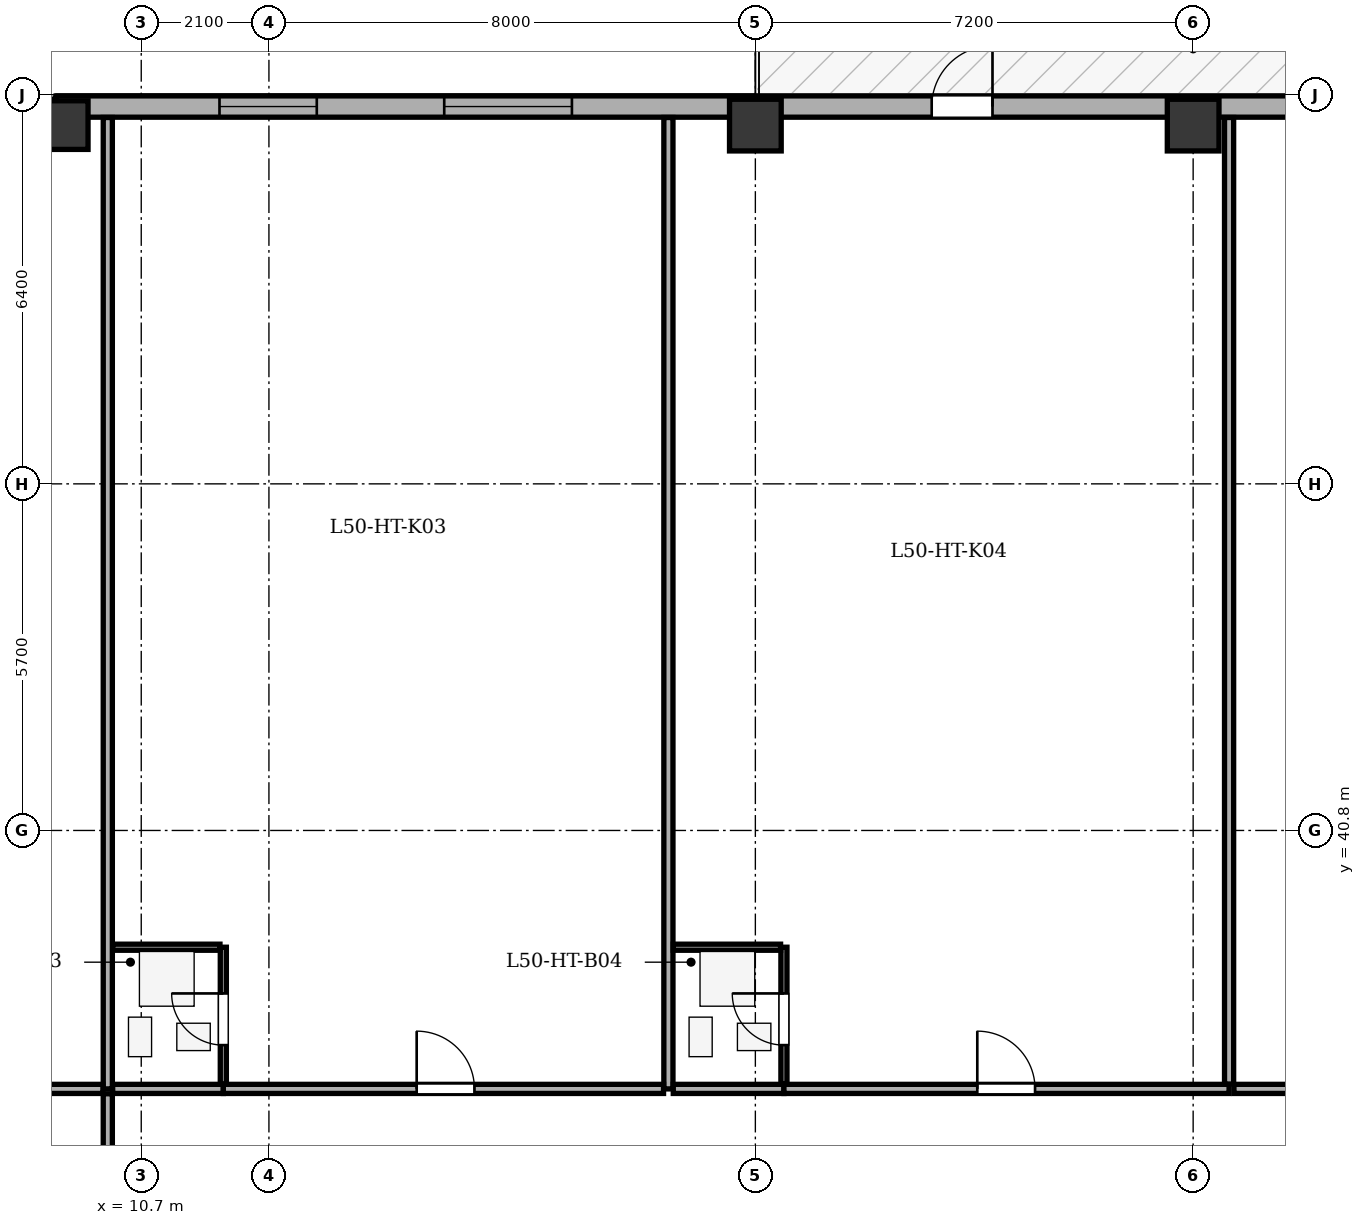
"""IFC4 building model, lengths in metres.
Left out: names, types, materials, properties, quantities, classifications, styles, units other than length and angle.
Written with IfcOpenShell. Run it as: python <this file> out.ifc"""

import sys

from ifc_helpers import new_model, si_unit, direction, frame, frame_2d, origin, origin_2d, place, context, subcontext, project, spatial, rectangle, extrude, element, fill, save


model = new_model("IFC4")
c1 = context("Model", 3, precision=1e-05, world=origin(), true_north=direction((0.0, 1.0)))
c2 = subcontext(c1, "Body", "Model", "MODEL_VIEW")
j1 = project(units=[si_unit("LENGTHUNIT", "METRE"), si_unit("PLANEANGLEUNIT", "RADIAN")], contexts=[c1])
p1 = place(None, origin())
s1 = spatial("IfcSite", under=j1, at=p1, CompositionType="ELEMENT")
p2 = place(p1, origin())
s2 = spatial("IfcBuilding", under=s1, at=p2, CompositionType="ELEMENT")
p3 = place(p2, frame((0.0, 0.0, 193.8)))
s3 = spatial("IfcBuildingStorey", under=s2, at=p3, CompositionType="ELEMENT", Elevation=193.8)
p4 = place(p3, frame((9.3, 52.4, 0.0), z_axis=(0.0, 0.0, 1.0), x_axis=(1.0, 0.0, 0.0)))
e1 = element("IfcColumn", 1, at=p4, inside=s3, PredefinedType="COLUMN", context=c2, shape_type="SweptSolid", body=[
    extrude(rectangle(XDim=0.8, YDim=1.05, at=origin_2d()), origin(), (0.0, 0.0, 1.0), 3.5),
])
for number, where, z_axis, x_axis in (
    (2, (20.8, 52.4, 0.0), (0.0, 0.0, 1.0), (1.0, 0.0, 0.0)),
    (3, (28.0, 52.4, 0.0), (0.0, 0.0, 1.0), (1.0, 0.0, 0.0)),
):
    element("IfcColumn", number, at=place(p3, frame(where, z_axis=z_axis, x_axis=x_axis)), inside=s3, PredefinedType="COLUMN", context=c2, shape_type="SweptSolid", body=[
        extrude(rectangle(XDim=0.85, YDim=0.85, at=origin_2d()), origin(), (0.0, 0.0, 1.0), 3.5),
    ])
p5 = place(p3, frame((4.495, 47.9, 0.0), z_axis=(0.0, 0.0, 1.0), x_axis=(0.707088817216, 0.7071247447, 0.0)))
e4 = element("IfcWall", 4, at=p5, inside=s3, PredefinedType="STANDARD", context=c2, shape_type="SweptSolid", body=[
    extrude(rectangle(XDim=6.795, YDim=0.35, at=frame_2d((3.398, 0.0))), origin(), (0.0, 0.0, 1.0), 2.635),
])
p6 = place(p5, frame((2.698, 0.0, 0.75)))
e5 = element("IfcOpeningElement", 5, at=p6, cuts=e4, PredefinedType="OPENING", context=c2, shape_type="SweptSolid", body=[
    extrude(rectangle(XDim=1.4, YDim=1.65, at=frame_2d((0.7, 0.825))), frame((0.0, 0.185, 0.0), z_axis=(0.0, -1.0, 0.0), x_axis=(1.0, 0.0, 0.0)), (0.0, 0.0, 1.0), 0.37),
])
p7 = place(p3, frame((9.3, 52.705, 0.0), z_axis=(0.0, 0.0, 1.0), x_axis=(1.0, 0.0, 0.0)))
e6 = element("IfcWall", 6, at=p7, inside=s3, PredefinedType="STANDARD", context=c2, shape_type="SweptSolid", body=[
    extrude(rectangle(XDim=35.0, YDim=0.35, at=frame_2d((17.5, 0.0))), origin(), (0.0, 0.0, 1.0), 2.635),
])
p8 = place(p7, frame((14.4, 0.0, 0.0)))
e7 = element("IfcOpeningElement", 7, at=p8, cuts=e6, PredefinedType="OPENING", context=c2, shape_type="SweptSolid", body=[
    extrude(rectangle(XDim=1.0, YDim=2.02, at=frame_2d((0.5, 1.01))), frame((0.0, 0.185, 0.0), z_axis=(0.0, -1.0, 0.0), x_axis=(1.0, 0.0, 0.0)), (0.0, 0.0, 1.0), 0.37),
])
p9 = place(p7, frame((2.687, 0.0, 0.75)))
e8 = element("IfcOpeningElement", 8, at=p9, cuts=e6, PredefinedType="OPENING", context=c2, shape_type="SweptSolid", body=[
    extrude(rectangle(XDim=1.6, YDim=1.75, at=frame_2d((0.8, 0.875))), frame((0.0, 0.185, 0.0), z_axis=(0.0, -1.0, 0.0), x_axis=(1.0, 0.0, 0.0)), (0.0, 0.0, 1.0), 0.37),
])
p10 = place(p7, frame((6.383, 0.0, 0.75)))
e9 = element("IfcOpeningElement", 9, at=p10, cuts=e6, PredefinedType="OPENING", context=c2, shape_type="SweptSolid", body=[
    extrude(rectangle(XDim=2.1, YDim=1.75, at=frame_2d((1.05, 0.875))), frame((0.0, 0.185, 0.0), z_axis=(0.0, -1.0, 0.0), x_axis=(1.0, 0.0, 0.0)), (0.0, 0.0, 1.0), 0.37),
])
p11 = place(p7, frame((20.404, 0.0, 0.75)))
e10 = element("IfcOpeningElement", 10, at=p11, cuts=e6, PredefinedType="OPENING", context=c2, shape_type="SweptSolid", body=[
    extrude(rectangle(XDim=1.6, YDim=1.75, at=frame_2d((0.8, 0.875))), frame((0.0, 0.185, 0.0), z_axis=(0.0, -1.0, 0.0), x_axis=(1.0, 0.0, 0.0)), (0.0, 0.0, 1.0), 0.37),
])
p12 = place(p7, frame((23.012, 0.0, 0.75)))
e11 = element("IfcOpeningElement", 11, at=p12, cuts=e6, PredefinedType="OPENING", context=c2, shape_type="SweptSolid", body=[
    extrude(rectangle(XDim=1.6, YDim=1.75, at=frame_2d((0.8, 0.875))), frame((0.0, 0.185, 0.0), z_axis=(0.0, -1.0, 0.0), x_axis=(1.0, 0.0, 0.0)), (0.0, 0.0, 1.0), 0.37),
])
p13 = place(p7, frame((27.764, 0.0, 0.75)))
e12 = element("IfcOpeningElement", 12, at=p13, cuts=e6, PredefinedType="OPENING", context=c2, shape_type="SweptSolid", body=[
    extrude(rectangle(XDim=1.6, YDim=1.75, at=frame_2d((0.8, 0.875))), frame((0.0, 0.185, 0.0), z_axis=(0.0, -1.0, 0.0), x_axis=(1.0, 0.0, 0.0)), (0.0, 0.0, 1.0), 0.37),
])
p14 = place(p7, frame((31.186, 0.0, 0.75)))
e13 = element("IfcOpeningElement", 13, at=p14, cuts=e6, PredefinedType="OPENING", context=c2, shape_type="SweptSolid", body=[
    extrude(rectangle(XDim=2.1, YDim=1.75, at=frame_2d((1.05, 0.875))), frame((0.0, 0.185, 0.0), z_axis=(0.0, -1.0, 0.0), x_axis=(1.0, 0.0, 0.0)), (0.0, 0.0, 1.0), 0.37),
])
for number, where, z_axis, x_axis in (
    (14, (10.15, 36.55, 0.0), (0.0, 0.0, 1.0), (0.0, 1.0, 0.0)),
    (15, (19.37, 36.55, 0.0), (0.0, 0.0, 1.0), (0.0, 1.0, 0.0)),
):
    element("IfcWall", number, at=place(p3, frame(where, z_axis=z_axis, x_axis=x_axis)), inside=s3, PredefinedType="PARTITIONING", context=c2, shape_type="SweptSolid", body=[
        extrude(rectangle(XDim=15.975, YDim=0.15, at=frame_2d((7.987, 0.0))), origin(), (0.0, 0.0, 1.0), 3.05),
    ])
p15 = place(p3, frame((10.23, 36.55, 0.0), z_axis=(0.0, 0.0, 1.0), x_axis=(1.0, 0.0, 0.0)))
e16 = element("IfcWall", 16, at=p15, inside=s3, PredefinedType="PARTITIONING", context=c2, shape_type="SweptSolid", body=[
    extrude(rectangle(XDim=1.82, YDim=0.15, at=frame_2d((0.91, 0.0))), origin(), (0.0, 0.0, 1.0), 3.05),
])
p16 = place(p3, frame((12.05, 36.55, 0.0), z_axis=(0.0, 0.0, 1.0), x_axis=(1.0, 0.0, 0.0)))
e17 = element("IfcWall", 17, at=p16, inside=s3, PredefinedType="PARTITIONING", context=c2, shape_type="SweptSolid", body=[
    extrude(rectangle(XDim=7.24, YDim=0.15, at=frame_2d((3.62, 0.0))), origin(), (0.0, 0.0, 1.0), 3.05),
])
p17 = place(p16, frame((3.18, 0.0, 0.0)))
e18 = element("IfcOpeningElement", 18, at=p17, cuts=e17, PredefinedType="OPENING", context=c2, shape_type="SweptSolid", body=[
    extrude(rectangle(XDim=0.95, YDim=2.1, at=frame_2d((0.475, 1.05))), frame((0.0, 0.085, 0.0), z_axis=(0.0, -1.0, 0.0), x_axis=(1.0, 0.0, 0.0)), (0.0, 0.0, 1.0), 0.17),
])
p18 = place(p3, frame((12.05, 36.63, 0.0), z_axis=(0.0, 0.0, 1.0), x_axis=(0.0, 1.0, 0.0)))
e19 = element("IfcWall", 19, at=p18, inside=s3, PredefinedType="PARTITIONING", context=c2, shape_type="SweptSolid", body=[
    extrude(rectangle(XDim=2.25, YDim=0.1, at=frame_2d((1.125, 0.0))), origin(), (0.0, 0.0, 1.0), 3.05),
])
p19 = place(p18, frame((0.64, 0.0, 0.0)))
e20 = element("IfcOpeningElement", 20, at=p19, cuts=e19, PredefinedType="OPENING", context=c2, shape_type="SweptSolid", body=[
    extrude(rectangle(XDim=0.85, YDim=2.05, at=frame_2d((0.425, 1.025))), frame((0.0, 0.06, 0.0), z_axis=(0.0, -1.0, 0.0), x_axis=(1.0, 0.0, 0.0)), (0.0, 0.0, 1.0), 0.12),
])
p20 = place(p3, frame((10.23, 38.88, 0.0), z_axis=(0.0, 0.0, 1.0), x_axis=(1.0, 0.0, 0.0)))
e21 = element("IfcWall", 21, at=p20, inside=s3, PredefinedType="PARTITIONING", context=c2, shape_type="SweptSolid", body=[
    extrude(rectangle(XDim=1.765, YDim=0.1, at=frame_2d((0.883, 0.0))), origin(), (0.0, 0.0, 1.0), 3.05),
])
p21 = place(p3, frame((19.45, 36.55, 0.0), z_axis=(0.0, 0.0, 1.0), x_axis=(1.0, 0.0, 0.0)))
e22 = element("IfcWall", 22, at=p21, inside=s3, PredefinedType="PARTITIONING", context=c2, shape_type="SweptSolid", body=[
    extrude(rectangle(XDim=1.82, YDim=0.15, at=frame_2d((0.91, 0.0))), origin(), (0.0, 0.0, 1.0), 3.05),
])
p22 = place(p3, frame((21.27, 36.55, 0.0), z_axis=(0.0, 0.0, 1.0), x_axis=(1.0, 0.0, 0.0)))
e23 = element("IfcWall", 23, at=p22, inside=s3, PredefinedType="PARTITIONING", context=c2, shape_type="SweptSolid", body=[
    extrude(rectangle(XDim=7.321, YDim=0.15, at=frame_2d((3.661, 0.0))), origin(), (0.0, 0.0, 1.0), 3.05),
])
p23 = place(p22, frame((3.18, 0.0, 0.0)))
e24 = element("IfcOpeningElement", 24, at=p23, cuts=e23, PredefinedType="OPENING", context=c2, shape_type="SweptSolid", body=[
    extrude(rectangle(XDim=0.95, YDim=2.1, at=frame_2d((0.475, 1.05))), frame((0.0, 0.085, 0.0), z_axis=(0.0, -1.0, 0.0), x_axis=(1.0, 0.0, 0.0)), (0.0, 0.0, 1.0), 0.17),
])
p24 = place(p3, frame((21.27, 36.63, 0.0), z_axis=(0.0, 0.0, 1.0), x_axis=(0.0, 1.0, 0.0)))
e25 = element("IfcWall", 25, at=p24, inside=s3, PredefinedType="PARTITIONING", context=c2, shape_type="SweptSolid", body=[
    extrude(rectangle(XDim=2.25, YDim=0.1, at=frame_2d((1.125, 0.0))), origin(), (0.0, 0.0, 1.0), 3.05),
])
p25 = place(p24, frame((0.64, 0.0, 0.0)))
e26 = element("IfcOpeningElement", 26, at=p25, cuts=e25, PredefinedType="OPENING", context=c2, shape_type="SweptSolid", body=[
    extrude(rectangle(XDim=0.85, YDim=2.05, at=frame_2d((0.425, 1.025))), frame((0.0, 0.06, 0.0), z_axis=(0.0, -1.0, 0.0), x_axis=(1.0, 0.0, 0.0)), (0.0, 0.0, 1.0), 0.12),
])
p26 = place(p3, frame((19.45, 38.88, 0.0), z_axis=(0.0, 0.0, 1.0), x_axis=(1.0, 0.0, 0.0)))
e27 = element("IfcWall", 27, at=p26, inside=s3, PredefinedType="PARTITIONING", context=c2, shape_type="SweptSolid", body=[
    extrude(rectangle(XDim=1.765, YDim=0.1, at=frame_2d((0.883, 0.0))), origin(), (0.0, 0.0, 1.0), 3.05),
])
p27 = place(p3, frame((28.591, 36.63, 0.0), z_axis=(0.0, 0.0, 1.0), x_axis=(0.0, 1.0, 0.0)))
e28 = element("IfcWall", 28, at=p27, inside=s3, PredefinedType="PARTITIONING", context=c2, shape_type="SweptSolid", body=[
    extrude(rectangle(XDim=15.895, YDim=0.15, at=frame_2d((7.948, 0.0))), origin(), (0.0, 0.0, 1.0), 3.05),
])
p28 = place(p3, frame((28.671, 36.55, 0.0), z_axis=(0.0, 0.0, 1.0), x_axis=(1.0, 0.0, 0.0)))
e29 = element("IfcWall", 29, at=p28, inside=s3, PredefinedType="PARTITIONING", context=c2, shape_type="SweptSolid", body=[
    extrude(rectangle(XDim=15.629, YDim=0.15, at=frame_2d((7.814, 0.0))), origin(), (0.0, 0.0, 1.0), 3.05),
])
p29 = place(p28, frame((7.255, 0.0, 0.0)))
e30 = element("IfcOpeningElement", 30, at=p29, cuts=e29, PredefinedType="OPENING", context=c2, shape_type="SweptSolid", body=[
    extrude(rectangle(XDim=1.0, YDim=2.1, at=frame_2d((0.5, 1.05))), frame((0.0, 0.085, 0.0), z_axis=(0.0, -1.0, 0.0), x_axis=(1.0, 0.0, 0.0)), (0.0, 0.0, 1.0), 0.17),
])
p30 = place(p3, frame((4.675, 36.55, 0.0), z_axis=(0.0, 0.0, 1.0), x_axis=(1.0, 0.0, 0.0)))
e31 = element("IfcWall", 31, at=p30, inside=s3, PredefinedType="PARTITIONING", context=c2, shape_type="SweptSolid", body=[
    extrude(rectangle(XDim=5.395, YDim=0.15, at=frame_2d((2.698, 0.0))), origin(), (0.0, 0.0, 1.0), 3.05),
])
p31 = place(p3, frame((10.15, 17.93, 0.0), z_axis=(0.0, 0.0, 1.0), x_axis=(0.0, 1.0, 0.0)))
e32 = element("IfcWall", 32, at=p31, inside=s3, PredefinedType="PARTITIONING", context=c2, shape_type="SweptSolid", body=[
    extrude(rectangle(XDim=18.54, YDim=0.15, at=frame_2d((9.27, 0.0))), origin(), (0.0, 0.0, 1.0), 3.05),
])
p32 = place(p31, frame((8.79, 0.0, 0.0)))
e33 = element("IfcOpeningElement", 33, at=p32, cuts=e32, PredefinedType="OPENING", context=c2, shape_type="SweptSolid", body=[
    extrude(rectangle(XDim=0.95, YDim=2.1, at=frame_2d((0.475, 1.05))), frame((0.0, 0.085, 0.0), z_axis=(0.0, -1.0, 0.0), x_axis=(1.0, 0.0, 0.0)), (0.0, 0.0, 1.0), 0.17),
])
p33 = place(p8, origin())
e34 = element("IfcDoor", 34, at=p33, inside=s3, OperationType="SINGLE_SWING_RIGHT", PredefinedType="DOOR", context=c2, shape_type="SweptSolid", body=[
    extrude(rectangle(XDim=1.0, YDim=2.02, at=frame_2d((0.5, 1.01))), frame((0.0, 0.025, 0.0), z_axis=(0.0, -1.0, 0.0), x_axis=(1.0, 0.0, 0.0)), (0.0, 0.0, 1.0), 0.05),
])
fill(e7, e34)
p34 = place(p9, origin())
e35 = element("IfcWindow", 35, at=p34, inside=s3, PartitioningType="SINGLE_PANEL", PredefinedType="WINDOW", context=c2, shape_type="SweptSolid", body=[
    extrude(rectangle(XDim=1.6, YDim=1.75, at=frame_2d((0.8, 0.875))), frame((0.0, -0.01, 0.0), z_axis=(0.0, -1.0, 0.0), x_axis=(1.0, 0.0, 0.0)), (0.0, 0.0, 1.0), 0.06),
])
fill(e8, e35)
p35 = place(p10, origin())
e36 = element("IfcWindow", 36, at=p35, inside=s3, PartitioningType="SINGLE_PANEL", PredefinedType="WINDOW", context=c2, shape_type="SweptSolid", body=[
    extrude(rectangle(XDim=2.1, YDim=1.75, at=frame_2d((1.05, 0.875))), frame((0.0, -0.01, 0.0), z_axis=(0.0, -1.0, 0.0), x_axis=(1.0, 0.0, 0.0)), (0.0, 0.0, 1.0), 0.06),
])
fill(e9, e36)
p36 = place(p19, origin())
e37 = element("IfcDoor", 37, at=p36, inside=s3, OperationType="SINGLE_SWING_RIGHT", PredefinedType="DOOR", context=c2, shape_type="SweptSolid", body=[
    extrude(rectangle(XDim=0.85, YDim=2.05, at=frame_2d((0.425, 1.025))), frame((0.0, 0.025, 0.0), z_axis=(0.0, -1.0, 0.0), x_axis=(1.0, 0.0, 0.0)), (0.0, 0.0, 1.0), 0.05),
])
fill(e20, e37)
p37 = place(p17, origin())
e38 = element("IfcDoor", 38, at=p37, inside=s3, OperationType="SINGLE_SWING_LEFT", PredefinedType="DOOR", context=c2, shape_type="SweptSolid", body=[
    extrude(rectangle(XDim=0.95, YDim=2.1, at=frame_2d((0.475, 1.05))), frame((0.0, 0.025, 0.0), z_axis=(0.0, -1.0, 0.0), x_axis=(1.0, 0.0, 0.0)), (0.0, 0.0, 1.0), 0.05),
])
fill(e18, e38)
p38 = place(p25, origin())
e39 = element("IfcDoor", 39, at=p38, inside=s3, OperationType="SINGLE_SWING_RIGHT", PredefinedType="DOOR", context=c2, shape_type="SweptSolid", body=[
    extrude(rectangle(XDim=0.85, YDim=2.05, at=frame_2d((0.425, 1.025))), frame((0.0, 0.025, 0.0), z_axis=(0.0, -1.0, 0.0), x_axis=(1.0, 0.0, 0.0)), (0.0, 0.0, 1.0), 0.05),
])
fill(e26, e39)
p39 = place(p23, origin())
e40 = element("IfcDoor", 40, at=p39, inside=s3, OperationType="SINGLE_SWING_LEFT", PredefinedType="DOOR", context=c2, shape_type="SweptSolid", body=[
    extrude(rectangle(XDim=0.95, YDim=2.1, at=frame_2d((0.475, 1.05))), frame((0.0, 0.025, 0.0), z_axis=(0.0, -1.0, 0.0), x_axis=(1.0, 0.0, 0.0)), (0.0, 0.0, 1.0), 0.05),
])
fill(e24, e40)
save(model, sys.argv[1])
